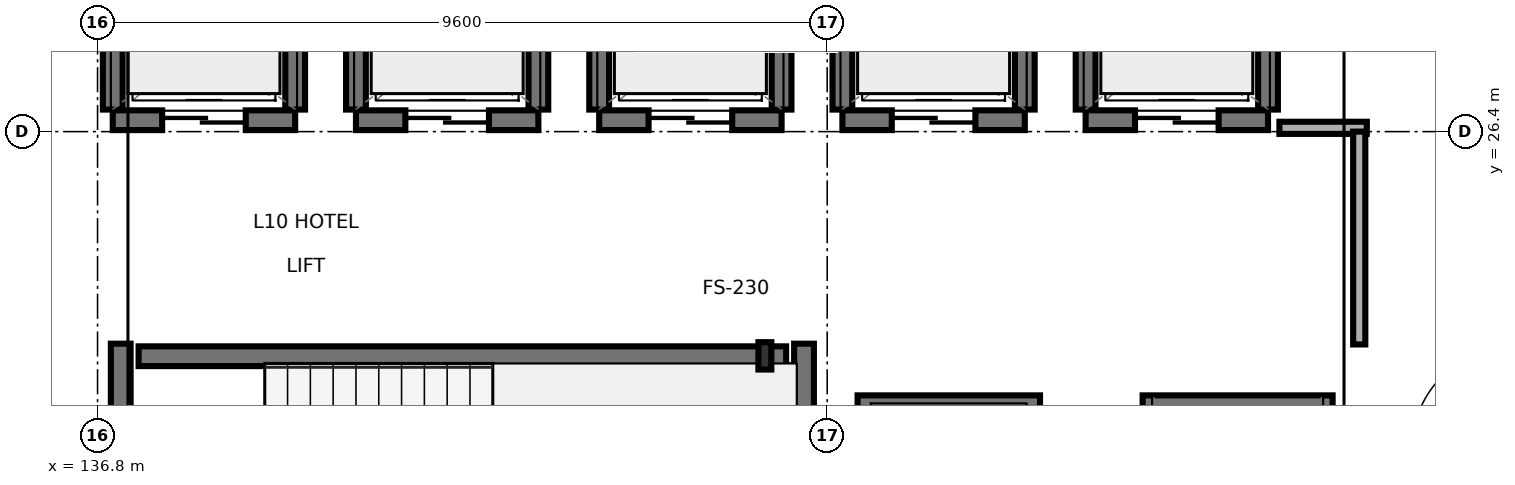
"""IFC4 building model, lengths in metres.
Left out: names, types, materials, properties, quantities, classifications, styles, units other than length and angle.
Written with IfcOpenShell. Run it as: python <this file> out.ifc"""

import sys

from ifc_helpers import new_model, si_unit, direction, frame, frame_2d, origin, origin_2d, place, context, subcontext, project, spatial, rectangle, i_section, extrude, element, fill, save


model = new_model("IFC4")
c1 = context("Model", 3, precision=1e-05, world=origin(), true_north=direction((0.0, 1.0)))
c2 = subcontext(c1, "Body", "Model", "MODEL_VIEW")
j1 = project(units=[si_unit("LENGTHUNIT", "METRE"), si_unit("PLANEANGLEUNIT", "RADIAN")], contexts=[c1])
p1 = place(None, origin())
s1 = spatial("IfcSite", under=j1, at=p1, CompositionType="ELEMENT")
p2 = place(p1, origin())
s2 = spatial("IfcBuilding", under=s1, at=p2, CompositionType="ELEMENT")
p3 = place(p2, frame((0.0, 0.0, 35.1)))
s3 = spatial("IfcBuildingStorey", under=s2, at=p3, CompositionType="ELEMENT", Elevation=35.1)
p4 = place(p3, frame((145.58, 23.45, 0.0), z_axis=(0.0, 0.0, 1.0), x_axis=(1.0, 0.0, 0.0)))
e1 = element("IfcColumn", 1, at=p4, inside=s3, PredefinedType="PILASTER", context=c2, shape_type="SweptSolid", body=[
    extrude(i_section(OverallWidth=0.17, OverallDepth=0.36, WebThickness=0.008, FlangeThickness=0.013, FilletRadius=0.018, at=origin_2d()), origin(), (0.0, 0.0, 1.0), 3.4),
])
p5 = place(p3, frame((137.105, 19.34, 0.0), z_axis=(0.0, 0.0, 1.0), x_axis=(0.0, 1.0, 0.0)))
e2 = element("IfcWall", 2, at=p5, inside=s3, PredefinedType="SHEAR", context=c2, shape_type="SweptSolid", body=[
    extrude(rectangle(XDim=4.27, YDim=0.26, at=frame_2d((2.135, 0.0))), origin(), (0.0, 0.0, 1.0), 3.165),
])
p6 = place(p5, frame((0.61, 0.0, 0.0)))
e3 = element("IfcOpeningElement", 3, at=p6, cuts=e2, PredefinedType="OPENING", context=c2, shape_type="SweptSolid", body=[
    extrude(rectangle(XDim=1.1, YDim=2.2, at=frame_2d((0.55, 1.1))), frame((0.0, 0.14, 0.0), z_axis=(0.0, -1.0, 0.0), x_axis=(1.0, 0.0, 0.0)), (0.0, 0.0, 1.0), 0.28),
])
p7 = place(p3, frame((146.095, 19.34, 0.0), z_axis=(0.0, 0.0, 1.0), x_axis=(0.0, 1.0, 0.0)))
e4 = element("IfcWall", 4, at=p7, inside=s3, PredefinedType="SHEAR", context=c2, shape_type="SweptSolid", body=[
    extrude(rectangle(XDim=4.27, YDim=0.26, at=frame_2d((2.135, 0.0))), origin(), (0.0, 0.0, 1.0), 3.165),
])
p8 = place(p3, frame((137.34, 23.445, 0.0), z_axis=(0.0, 0.0, 1.0), x_axis=(1.0, 0.0, 0.0)))
e5 = element("IfcWall", 5, at=p8, inside=s3, PredefinedType="SHEAR", context=c2, shape_type="SweptSolid", body=[
    extrude(rectangle(XDim=8.52, YDim=0.26, at=frame_2d((4.26, 0.0))), origin(), (0.0, 0.0, 1.0), 3.165),
])
p9 = place(p3, frame((137.0, 26.55, 0.0), z_axis=(0.0, 0.0, 1.0), x_axis=(1.0, 0.0, 0.0)))
e6 = element("IfcWall", 6, at=p9, inside=s3, PredefinedType="SHEAR", context=c2, shape_type="SweptSolid", body=[
    extrude(rectangle(XDim=2.4, YDim=0.26, at=frame_2d((1.2, 0.0))), origin(), (0.0, 0.0, 1.0), 2.7),
])
p10 = place(p9, frame((0.65, 0.0, 0.0)))
e7 = element("IfcOpeningElement", 7, at=p10, cuts=e6, PredefinedType="OPENING", context=c2, shape_type="SweptSolid", body=[
    extrude(rectangle(XDim=1.1, YDim=2.2, at=frame_2d((0.55, 1.1))), frame((0.0, 0.14, 0.0), z_axis=(0.0, -1.0, 0.0), x_axis=(1.0, 0.0, 0.0)), (0.0, 0.0, 1.0), 0.28),
])
for number, where, z_axis, x_axis in (
    (8, (137.0, 26.69, 0.0), (0.0, 0.0, 1.0), (0.0, 1.0, 0.0)),
    (9, (139.4, 26.69, 0.0), (0.0, 0.0, 1.0), (0.0, 1.0, 0.0)),
):
    element("IfcWall", number, at=place(p3, frame(where, z_axis=z_axis, x_axis=x_axis)), inside=s3, PredefinedType="SHEAR", context=c2, shape_type="SweptSolid", body=[
        extrude(rectangle(XDim=1.82, YDim=0.26, at=frame_2d((0.91, 0.0))), origin(), (0.0, 0.0, 1.0), 2.7),
    ])
p11 = place(p3, frame((140.2, 26.55, 0.0), z_axis=(0.0, 0.0, 1.0), x_axis=(1.0, 0.0, 0.0)))
e10 = element("IfcWall", 10, at=p11, inside=s3, PredefinedType="SHEAR", context=c2, shape_type="SweptSolid", body=[
    extrude(rectangle(XDim=2.4, YDim=0.26, at=frame_2d((1.2, 0.0))), origin(), (0.0, 0.0, 1.0), 3.165),
])
p12 = place(p11, frame((0.65, 0.0, 0.0)))
e11 = element("IfcOpeningElement", 11, at=p12, cuts=e10, PredefinedType="OPENING", context=c2, shape_type="SweptSolid", body=[
    extrude(rectangle(XDim=1.1, YDim=2.2, at=frame_2d((0.55, 1.1))), frame((0.0, 0.14, 0.0), z_axis=(0.0, -1.0, 0.0), x_axis=(1.0, 0.0, 0.0)), (0.0, 0.0, 1.0), 0.28),
])
for number, where, z_axis, x_axis in (
    (12, (140.2, 26.69, 0.0), (0.0, 0.0, 1.0), (0.0, 1.0, 0.0)),
    (13, (142.6, 26.69, 0.0), (0.0, 0.0, 1.0), (0.0, 1.0, 0.0)),
):
    element("IfcWall", number, at=place(p3, frame(where, z_axis=z_axis, x_axis=x_axis)), inside=s3, PredefinedType="SHEAR", context=c2, shape_type="SweptSolid", body=[
        extrude(rectangle(XDim=1.82, YDim=0.26, at=frame_2d((0.91, 0.0))), origin(), (0.0, 0.0, 1.0), 3.165),
    ])
p13 = place(p3, frame((143.4, 26.55, 0.0), z_axis=(0.0, 0.0, 1.0), x_axis=(1.0, 0.0, 0.0)))
e14 = element("IfcWall", 14, at=p13, inside=s3, PredefinedType="SHEAR", context=c2, shape_type="SweptSolid", body=[
    extrude(rectangle(XDim=2.4, YDim=0.26, at=frame_2d((1.2, 0.0))), origin(), (0.0, 0.0, 1.0), 3.165),
])
p14 = place(p13, frame((0.65, 0.0, 0.0)))
e15 = element("IfcOpeningElement", 15, at=p14, cuts=e14, PredefinedType="OPENING", context=c2, shape_type="SweptSolid", body=[
    extrude(rectangle(XDim=1.1, YDim=2.2, at=frame_2d((0.55, 1.1))), frame((0.0, 0.14, 0.0), z_axis=(0.0, -1.0, 0.0), x_axis=(1.0, 0.0, 0.0)), (0.0, 0.0, 1.0), 0.28),
])
for number, where, z_axis, x_axis in (
    (16, (143.4, 26.69, 0.0), (0.0, 0.0, 1.0), (0.0, 1.0, 0.0)),
    (17, (145.8, 26.69, 0.0), (0.0, 0.0, 1.0), (0.0, 1.0, 0.0)),
):
    element("IfcWall", number, at=place(p3, frame(where, z_axis=z_axis, x_axis=x_axis)), inside=s3, PredefinedType="SHEAR", context=c2, shape_type="SweptSolid", body=[
        extrude(rectangle(XDim=1.82, YDim=0.26, at=frame_2d((0.91, 0.0))), origin(), (0.0, 0.0, 1.0), 3.165),
    ])
p15 = place(p3, frame((146.6, 26.55, 0.0), z_axis=(0.0, 0.0, 1.0), x_axis=(1.0, 0.0, 0.0)))
e18 = element("IfcWall", 18, at=p15, inside=s3, PredefinedType="SHEAR", context=c2, shape_type="SweptSolid", body=[
    extrude(rectangle(XDim=2.4, YDim=0.26, at=frame_2d((1.2, 0.0))), origin(), (0.0, 0.0, 1.0), 3.165),
])
p16 = place(p15, frame((0.65, 0.0, 0.0)))
e19 = element("IfcOpeningElement", 19, at=p16, cuts=e18, PredefinedType="OPENING", context=c2, shape_type="SweptSolid", body=[
    extrude(rectangle(XDim=1.1, YDim=2.2, at=frame_2d((0.55, 1.1))), frame((0.0, 0.14, 0.0), z_axis=(0.0, -1.0, 0.0), x_axis=(1.0, 0.0, 0.0)), (0.0, 0.0, 1.0), 0.28),
])
for number, where, z_axis, x_axis in (
    (20, (146.6, 26.69, 0.0), (0.0, 0.0, 1.0), (0.0, 1.0, 0.0)),
    (21, (149.0, 26.69, 0.0), (0.0, 0.0, 1.0), (0.0, 1.0, 0.0)),
):
    element("IfcWall", number, at=place(p3, frame(where, z_axis=z_axis, x_axis=x_axis)), inside=s3, PredefinedType="SHEAR", context=c2, shape_type="SweptSolid", body=[
        extrude(rectangle(XDim=1.82, YDim=0.26, at=frame_2d((0.91, 0.0))), origin(), (0.0, 0.0, 1.0), 3.165),
    ])
p17 = place(p3, frame((149.8, 26.55, 0.0), z_axis=(0.0, 0.0, 1.0), x_axis=(1.0, 0.0, 0.0)))
e22 = element("IfcWall", 22, at=p17, inside=s3, PredefinedType="SHEAR", context=c2, shape_type="SweptSolid", body=[
    extrude(rectangle(XDim=2.4, YDim=0.26, at=frame_2d((1.2, 0.0))), origin(), (0.0, 0.0, 1.0), 3.165),
])
p18 = place(p17, frame((0.65, 0.0, 0.0)))
e23 = element("IfcOpeningElement", 23, at=p18, cuts=e22, PredefinedType="OPENING", context=c2, shape_type="SweptSolid", body=[
    extrude(rectangle(XDim=1.1, YDim=2.2, at=frame_2d((0.55, 1.1))), frame((0.0, 0.14, 0.0), z_axis=(0.0, -1.0, 0.0), x_axis=(1.0, 0.0, 0.0)), (0.0, 0.0, 1.0), 0.28),
])
for number, where, z_axis, x_axis in (
    (24, (149.8, 26.69, 0.0), (0.0, 0.0, 1.0), (0.0, 1.0, 0.0)),
    (25, (152.2, 26.69, 0.0), (0.0, 0.0, 1.0), (0.0, 1.0, 0.0)),
):
    element("IfcWall", number, at=place(p3, frame(where, z_axis=z_axis, x_axis=x_axis)), inside=s3, PredefinedType="SHEAR", context=c2, shape_type="SweptSolid", body=[
        extrude(rectangle(XDim=1.82, YDim=0.26, at=frame_2d((0.91, 0.0))), origin(), (0.0, 0.0, 1.0), 3.165),
    ])
p19 = place(p3, frame((146.8, 22.8, 0.0), z_axis=(0.0, 0.0, 1.0), x_axis=(1.0, 0.0, 0.0)))
e26 = element("IfcWall", 26, at=p19, inside=s3, PredefinedType="SHEAR", context=c2, shape_type="SweptSolid", body=[
    extrude(rectangle(XDim=2.4, YDim=0.26, at=frame_2d((1.2, 0.0))), origin(), (0.0, 0.0, 1.0), 3.165),
])
p20 = place(p3, frame((150.55, 22.8, 0.0), z_axis=(0.0, 0.0, 1.0), x_axis=(1.0, 0.0, 0.0)))
e27 = element("IfcWall", 27, at=p20, inside=s3, PredefinedType="SHEAR", context=c2, shape_type="SweptSolid", body=[
    extrude(rectangle(XDim=2.5, YDim=0.26, at=frame_2d((1.25, 0.0))), origin(), (0.0, 0.0, 1.0), 3.165),
])
p21 = place(p3, frame((152.35, 26.45, 0.0), z_axis=(0.0, 0.0, 1.0), x_axis=(1.0, 0.0, 0.0)))
e28 = element("IfcWall", 28, at=p21, inside=s3, PredefinedType="PARTITIONING", context=c2, shape_type="SweptSolid", body=[
    extrude(rectangle(XDim=1.15, YDim=0.16, at=frame_2d((0.575, 0.0))), origin(), (0.0, 0.0, 1.0), 3.165),
])
p22 = place(p3, frame((153.4, 23.6, 0.0), z_axis=(0.0, 0.0, 1.0), x_axis=(0.0, 1.0, 0.0)))
e29 = element("IfcWall", 29, at=p22, inside=s3, PredefinedType="PARTITIONING", context=c2, shape_type="SweptSolid", body=[
    extrude(rectangle(XDim=2.8, YDim=0.16, at=frame_2d((1.4, 0.0))), origin(), (0.0, 0.0, 1.0), 3.165),
])
p23 = place(p10, origin())
e30 = element("IfcDoor", 30, at=p23, inside=s3, OperationType="SLIDING_TO_LEFT", PredefinedType="DOOR", context=c2, shape_type="SweptSolid", body=[
    extrude(rectangle(XDim=1.1, YDim=2.2, at=frame_2d((0.55, 1.1))), frame((0.0, 0.025, 0.0), z_axis=(0.0, -1.0, 0.0), x_axis=(1.0, 0.0, 0.0)), (0.0, 0.0, 1.0), 0.05),
])
fill(e7, e30)
p24 = place(p12, origin())
e31 = element("IfcDoor", 31, at=p24, inside=s3, OperationType="SLIDING_TO_RIGHT", PredefinedType="DOOR", context=c2, shape_type="SweptSolid", body=[
    extrude(rectangle(XDim=1.1, YDim=2.2, at=frame_2d((0.55, 1.1))), frame((0.0, 0.025, 0.0), z_axis=(0.0, -1.0, 0.0), x_axis=(1.0, 0.0, 0.0)), (0.0, 0.0, 1.0), 0.05),
])
fill(e11, e31)
p25 = place(p14, origin())
e32 = element("IfcDoor", 32, at=p25, inside=s3, OperationType="SLIDING_TO_LEFT", PredefinedType="DOOR", context=c2, shape_type="SweptSolid", body=[
    extrude(rectangle(XDim=1.1, YDim=2.2, at=frame_2d((0.55, 1.1))), frame((0.0, 0.025, 0.0), z_axis=(0.0, -1.0, 0.0), x_axis=(1.0, 0.0, 0.0)), (0.0, 0.0, 1.0), 0.05),
])
fill(e15, e32)
p26 = place(p16, origin())
e33 = element("IfcDoor", 33, at=p26, inside=s3, OperationType="SLIDING_TO_RIGHT", PredefinedType="DOOR", context=c2, shape_type="SweptSolid", body=[
    extrude(rectangle(XDim=1.1, YDim=2.2, at=frame_2d((0.55, 1.1))), frame((0.0, 0.025, 0.0), z_axis=(0.0, -1.0, 0.0), x_axis=(1.0, 0.0, 0.0)), (0.0, 0.0, 1.0), 0.05),
])
fill(e19, e33)
p27 = place(p18, origin())
e34 = element("IfcDoor", 34, at=p27, inside=s3, OperationType="SLIDING_TO_LEFT", PredefinedType="DOOR", context=c2, shape_type="SweptSolid", body=[
    extrude(rectangle(XDim=1.1, YDim=2.2, at=frame_2d((0.55, 1.1))), frame((0.0, 0.025, 0.0), z_axis=(0.0, -1.0, 0.0), x_axis=(1.0, 0.0, 0.0)), (0.0, 0.0, 1.0), 0.05),
])
fill(e23, e34)
save(model, sys.argv[1])
